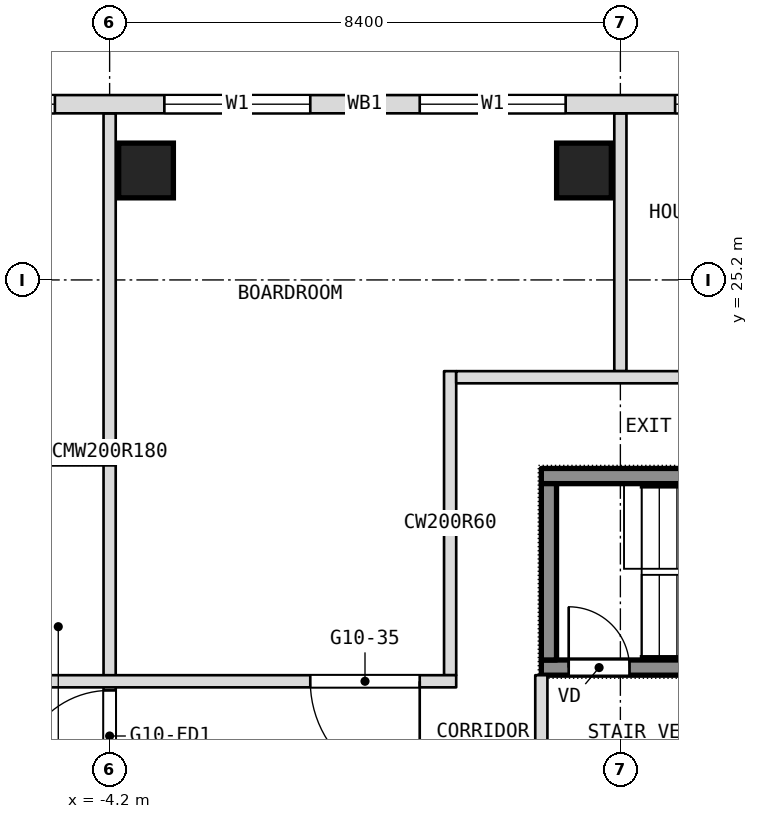
"""IFC4 building model, lengths in metres.
Left out: names, types, materials, properties, quantities, classifications, styles, units other than length and angle.
Written with IfcOpenShell. Run it as: python <this file> out.ifc"""

import sys

from ifc_helpers import new_model, si_unit, direction, frame, frame_2d, origin, origin_2d, place, context, subcontext, project, spatial, rectangle, extrude, element, fill, save


model = new_model("IFC4")
c1 = context("Model", 3, precision=1e-05, world=origin(), true_north=direction((0.0, 1.0)))
c2 = subcontext(c1, "Body", "Model", "MODEL_VIEW")
j1 = project(units=[si_unit("LENGTHUNIT", "METRE"), si_unit("PLANEANGLEUNIT", "RADIAN")], contexts=[c1])
p1 = place(None, origin())
s1 = spatial("IfcSite", under=j1, at=p1, CompositionType="ELEMENT")
p2 = place(p1, origin())
s2 = spatial("IfcBuilding", under=s1, at=p2, CompositionType="ELEMENT")
p3 = place(p2, frame((0.0, 0.0, 130.1)))
s3 = spatial("IfcBuildingStorey", under=s2, at=p3, CompositionType="ELEMENT", Elevation=130.1)
for number, where, z_axis, x_axis in (
    (1, (-3.601, 27.0, 0.0), (0.0, 0.0, 1.0), (1.0, 0.0, 0.0)),
    (2, (3.601, 27.0, 0.0), (0.0, 0.0, 1.0), (1.0, 0.0, 0.0)),
):
    element("IfcColumn", number, at=place(p3, frame(where, z_axis=z_axis, x_axis=x_axis)), inside=s3, PredefinedType="COLUMN", context=c2, shape_type="SweptSolid", body=[
        extrude(rectangle(XDim=0.9, YDim=0.9, at=origin_2d()), origin(), (0.0, 0.0, 1.0), 3.6),
    ])
p4 = place(p3, frame((4.2, 23.7, 0.0), z_axis=(0.0, 0.0, 1.0), x_axis=(0.0, 1.0, 0.0)))
e3 = element("IfcWall", 3, at=p4, inside=s3, PredefinedType="PARTITIONING", context=c2, shape_type="SweptSolid", body=[
    extrude(rectangle(XDim=4.24, YDim=0.2, at=frame_2d((2.12, 0.0))), origin(), (0.0, 0.0, 1.0), 3.34),
])
p5 = place(p3, frame((2.9, 16.9, 0.0), z_axis=(0.0, 0.0, 1.0), x_axis=(0.0, 1.0, 0.0)))
e4 = element("IfcWall", 4, at=p5, inside=s3, PredefinedType="PARTITIONING", context=c2, shape_type="SweptSolid", body=[
    extrude(rectangle(XDim=1.8, YDim=0.2, at=frame_2d((0.9, 0.0))), origin(), (0.0, 0.0, 1.0), 3.34),
])
p6 = place(p3, frame((1.4, 18.7, 0.0), z_axis=(0.0, 0.0, 1.0), x_axis=(0.0, 1.0, 0.0)))
e5 = element("IfcWall", 5, at=p6, inside=s3, PredefinedType="PARTITIONING", context=c2, shape_type="SweptSolid", body=[
    extrude(rectangle(XDim=5.0, YDim=0.2, at=frame_2d((2.5, 0.0))), origin(), (0.0, 0.0, 1.0), 3.34),
])
p7 = place(p3, frame((-4.2, 16.8, 0.0), z_axis=(0.0, 0.0, 1.0), x_axis=(0.0, 1.0, 0.0)))
e6 = element("IfcWall", 6, at=p7, inside=s3, PredefinedType="PARTITIONING", context=c2, shape_type="SweptSolid", body=[
    extrude(rectangle(XDim=11.14, YDim=0.2, at=frame_2d((5.57, 0.0))), origin(), (0.0, 0.0, 1.0), 3.34),
])
p8 = place(p7, frame((0.15, 0.0, 0.0)))
e7 = element("IfcOpeningElement", 7, at=p8, cuts=e6, PredefinedType="OPENING", context=c2, shape_type="SweptSolid", body=[
    extrude(rectangle(XDim=1.5, YDim=2.1, at=frame_2d((0.75, 1.05))), frame((0.0, 0.1, 0.0), z_axis=(0.0, -1.0, 0.0), x_axis=(1.0, 0.0, 0.0)), (0.0, 0.0, 1.0), 0.2),
])
p9 = place(p3, frame((-16.9, 18.6, 0.0), z_axis=(0.0, 0.0, 1.0), x_axis=(1.0, 0.0, 0.0)))
e8 = element("IfcWall", 8, at=p9, inside=s3, PredefinedType="PARTITIONING", context=c2, shape_type="SweptSolid", body=[
    extrude(rectangle(XDim=18.4, YDim=0.2, at=frame_2d((9.2, 0.0))), origin(), (0.0, 0.0, 1.0), 3.34),
])
p10 = place(p9, frame((0.5, 0.0, 0.0)))
e9 = element("IfcOpeningElement", 9, at=p10, cuts=e8, PredefinedType="OPENING", context=c2, shape_type="SweptSolid", body=[
    extrude(rectangle(XDim=1.0, YDim=2.1, at=frame_2d((0.5, 1.05))), frame((0.0, 0.1, 0.0), z_axis=(0.0, -1.0, 0.0), x_axis=(1.0, 0.0, 0.0)), (0.0, 0.0, 1.0), 0.2),
])
p11 = place(p9, frame((8.0, 0.0, 0.0)))
e10 = element("IfcOpeningElement", 10, at=p11, cuts=e8, PredefinedType="OPENING", context=c2, shape_type="SweptSolid", body=[
    extrude(rectangle(XDim=1.1, YDim=2.1, at=frame_2d((0.55, 1.05))), frame((0.0, 0.1, 0.0), z_axis=(0.0, -1.0, 0.0), x_axis=(1.0, 0.0, 0.0)), (0.0, 0.0, 1.0), 0.2),
])
p12 = place(p9, frame((16.0, 0.0, 0.0)))
e11 = element("IfcOpeningElement", 11, at=p12, cuts=e8, PredefinedType="OPENING", context=c2, shape_type="SweptSolid", body=[
    extrude(rectangle(XDim=1.8, YDim=2.1, at=frame_2d((0.9, 1.05))), frame((0.0, 0.1, 0.0), z_axis=(0.0, -1.0, 0.0), x_axis=(1.0, 0.0, 0.0)), (0.0, 0.0, 1.0), 0.2),
])
p13 = place(p3, frame((-6.65, 22.2, 0.0), z_axis=(0.0, 0.0, 1.0), x_axis=(1.0, 0.0, 0.0)))
e12 = element("IfcWall", 12, at=p13, inside=s3, PredefinedType="PARTITIONING", context=c2, shape_type="SweptSolid", body=[
    extrude(rectangle(XDim=2.55, YDim=0.1, at=frame_2d((1.275, 0.0))), origin(), (0.0, 0.0, 1.0), 3.34),
])
p14 = place(p3, frame((1.5, 23.6, 0.0), z_axis=(0.0, 0.0, 1.0), x_axis=(1.0, 0.0, 0.0)))
e13 = element("IfcWall", 13, at=p14, inside=s3, PredefinedType="PARTITIONING", context=c2, shape_type="SweptSolid", body=[
    extrude(rectangle(XDim=9.2, YDim=0.2, at=frame_2d((4.6, 0.0))), origin(), (0.0, 0.0, 1.0), 3.34),
])
p15 = place(p14, frame((4.3, 0.0, 0.0)))
e14 = element("IfcOpeningElement", 14, at=p15, cuts=e13, PredefinedType="OPENING", context=c2, shape_type="SweptSolid", body=[
    extrude(rectangle(XDim=1.0, YDim=2.1, at=frame_2d((0.5, 1.05))), frame((0.0, 0.1, 0.0), z_axis=(0.0, -1.0, 0.0), x_axis=(1.0, 0.0, 0.0)), (0.0, 0.0, 1.0), 0.2),
])
p16 = place(p3, frame((21.306, 28.09, 0.0), z_axis=(0.0, 0.0, 1.0), x_axis=(-1.0, 0.0, 0.0)))
e15 = element("IfcWall", 15, at=p16, inside=s3, PredefinedType="NOTDEFINED", context=c2, shape_type="SweptSolid", body=[
    extrude(rectangle(XDim=42.612, YDim=0.3, at=frame_2d((21.306, 0.0))), origin(), (0.0, 0.0, 1.0), 3.6),
])
p17 = place(p16, frame((5.406, 0.0, 0.9)))
e16 = element("IfcOpeningElement", 16, at=p17, cuts=e15, PredefinedType="OPENING", context=c2, shape_type="SweptSolid", body=[
    extrude(rectangle(XDim=2.4, YDim=2.1, at=frame_2d((1.2, 1.05))), frame((0.0, 0.15, 0.0), z_axis=(0.0, -1.0, 0.0), x_axis=(1.0, 0.0, 0.0)), (0.0, 0.0, 1.0), 0.3),
])
p18 = place(p16, frame((9.606, 0.0, 0.9)))
e17 = element("IfcOpeningElement", 17, at=p18, cuts=e15, PredefinedType="OPENING", context=c2, shape_type="SweptSolid", body=[
    extrude(rectangle(XDim=2.4, YDim=2.1, at=frame_2d((1.2, 1.05))), frame((0.0, 0.15, 0.0), z_axis=(0.0, -1.0, 0.0), x_axis=(1.0, 0.0, 0.0)), (0.0, 0.0, 1.0), 0.3),
])
p19 = place(p16, frame((13.806, 0.0, 0.9)))
e18 = element("IfcOpeningElement", 18, at=p19, cuts=e15, PredefinedType="OPENING", context=c2, shape_type="SweptSolid", body=[
    extrude(rectangle(XDim=2.4, YDim=2.1, at=frame_2d((1.2, 1.05))), frame((0.0, 0.15, 0.0), z_axis=(0.0, -1.0, 0.0), x_axis=(1.0, 0.0, 0.0)), (0.0, 0.0, 1.0), 0.3),
])
p20 = place(p16, frame((18.006, 0.0, 0.9)))
e19 = element("IfcOpeningElement", 19, at=p20, cuts=e15, PredefinedType="OPENING", context=c2, shape_type="SweptSolid", body=[
    extrude(rectangle(XDim=2.4, YDim=2.1, at=frame_2d((1.2, 1.05))), frame((0.0, 0.15, 0.0), z_axis=(0.0, -1.0, 0.0), x_axis=(1.0, 0.0, 0.0)), (0.0, 0.0, 1.0), 0.3),
])
p21 = place(p16, frame((22.206, 0.0, 0.9)))
e20 = element("IfcOpeningElement", 20, at=p21, cuts=e15, PredefinedType="OPENING", context=c2, shape_type="SweptSolid", body=[
    extrude(rectangle(XDim=2.4, YDim=2.1, at=frame_2d((1.2, 1.05))), frame((0.0, 0.15, 0.0), z_axis=(0.0, -1.0, 0.0), x_axis=(1.0, 0.0, 0.0)), (0.0, 0.0, 1.0), 0.3),
])
p22 = place(p16, frame((26.406, 0.0, 0.9)))
e21 = element("IfcOpeningElement", 21, at=p22, cuts=e15, PredefinedType="OPENING", context=c2, shape_type="SweptSolid", body=[
    extrude(rectangle(XDim=2.4, YDim=2.1, at=frame_2d((1.2, 1.05))), frame((0.0, 0.15, 0.0), z_axis=(0.0, -1.0, 0.0), x_axis=(1.0, 0.0, 0.0)), (0.0, 0.0, 1.0), 0.3),
])
p23 = place(p16, frame((30.606, 0.0, 0.9)))
e22 = element("IfcOpeningElement", 22, at=p23, cuts=e15, PredefinedType="OPENING", context=c2, shape_type="SweptSolid", body=[
    extrude(rectangle(XDim=2.4, YDim=2.1, at=frame_2d((1.2, 1.05))), frame((0.0, 0.15, 0.0), z_axis=(0.0, -1.0, 0.0), x_axis=(1.0, 0.0, 0.0)), (0.0, 0.0, 1.0), 0.3),
])
p24 = place(p16, frame((34.806, 0.0, 0.9)))
e23 = element("IfcOpeningElement", 23, at=p24, cuts=e15, PredefinedType="OPENING", context=c2, shape_type="SweptSolid", body=[
    extrude(rectangle(XDim=2.4, YDim=2.1, at=frame_2d((1.2, 1.05))), frame((0.0, 0.15, 0.0), z_axis=(0.0, -1.0, 0.0), x_axis=(1.0, 0.0, 0.0)), (0.0, 0.0, 1.0), 0.3),
])
p25 = place(p3, frame((2.9, 18.825, 0.1), z_axis=(0.0, 0.0, 1.0), x_axis=(1.0, 0.0, 0.0)))
e24 = element("IfcWall", 24, at=p25, inside=s3, PredefinedType="SHEAR", context=c2, shape_type="SweptSolid", body=[
    extrude(rectangle(XDim=6.2, YDim=0.25, at=frame_2d((3.1, 0.0))), origin(), (0.0, 0.0, 1.0), 3.6),
])
p26 = place(p25, frame((0.45, 0.0, 0.0)))
e25 = element("IfcOpeningElement", 25, at=p26, cuts=e24, PredefinedType="OPENING", context=c2, shape_type="SweptSolid", body=[
    extrude(rectangle(XDim=1.0, YDim=2.1, at=frame_2d((0.5, 1.05))), frame((0.0, 0.125, 0.0), z_axis=(0.0, -1.0, 0.0), x_axis=(1.0, 0.0, 0.0)), (0.0, 0.0, 1.0), 0.25),
])
p27 = place(p3, frame((2.9, 21.975, 0.1), z_axis=(0.0, 0.0, 1.0), x_axis=(1.0, 0.0, 0.0)))
e26 = element("IfcWall", 26, at=p27, inside=s3, PredefinedType="SHEAR", context=c2, shape_type="SweptSolid", body=[
    extrude(rectangle(XDim=6.2, YDim=0.25, at=frame_2d((3.1, 0.0))), origin(), (0.0, 0.0, 1.0), 3.6),
])
p28 = place(p3, frame((3.025, 18.95, 0.1), z_axis=(0.0, 0.0, 1.0), x_axis=(0.0, 1.0, 0.0)))
e27 = element("IfcWall", 27, at=p28, inside=s3, PredefinedType="SHEAR", context=c2, shape_type="SweptSolid", body=[
    extrude(rectangle(XDim=2.9, YDim=0.25, at=frame_2d((1.45, 0.0))), origin(), (0.0, 0.0, 1.0), 3.6),
])
p29 = place(p12, origin())
e28 = element("IfcDoor", 28, at=p29, inside=s3, OperationType="DOUBLE_DOOR_SINGLE_SWING", PredefinedType="DOOR", context=c2, shape_type="SweptSolid", body=[
    extrude(rectangle(XDim=1.8, YDim=2.1, at=frame_2d((0.9, 1.05))), frame((0.0, 0.025, 0.0), z_axis=(0.0, -1.0, 0.0), x_axis=(1.0, 0.0, 0.0)), (0.0, 0.0, 1.0), 0.05),
])
fill(e11, e28)
p30 = place(p19, origin())
e29 = element("IfcWindow", 29, at=p30, inside=s3, PartitioningType="SINGLE_PANEL", PredefinedType="WINDOW", context=c2, shape_type="SweptSolid", body=[
    extrude(rectangle(XDim=2.4, YDim=2.1, at=frame_2d((1.2, 1.05))), frame((0.0, 0.03, 0.0), z_axis=(0.0, -1.0, 0.0), x_axis=(1.0, 0.0, 0.0)), (0.0, 0.0, 1.0), 0.06),
])
fill(e18, e29)
p31 = place(p20, origin())
e30 = element("IfcWindow", 30, at=p31, inside=s3, PartitioningType="SINGLE_PANEL", PredefinedType="WINDOW", context=c2, shape_type="SweptSolid", body=[
    extrude(rectangle(XDim=2.4, YDim=2.1, at=frame_2d((1.2, 1.05))), frame((0.0, 0.03, 0.0), z_axis=(0.0, -1.0, 0.0), x_axis=(1.0, 0.0, 0.0)), (0.0, 0.0, 1.0), 0.06),
])
fill(e19, e30)
p32 = place(p21, origin())
e31 = element("IfcWindow", 31, at=p32, inside=s3, PartitioningType="SINGLE_PANEL", PredefinedType="WINDOW", context=c2, shape_type="SweptSolid", body=[
    extrude(rectangle(XDim=2.4, YDim=2.1, at=frame_2d((1.2, 1.05))), frame((0.0, 0.03, 0.0), z_axis=(0.0, -1.0, 0.0), x_axis=(1.0, 0.0, 0.0)), (0.0, 0.0, 1.0), 0.06),
])
fill(e20, e31)
p33 = place(p22, origin())
e32 = element("IfcWindow", 32, at=p33, inside=s3, PartitioningType="SINGLE_PANEL", PredefinedType="WINDOW", context=c2, shape_type="SweptSolid", body=[
    extrude(rectangle(XDim=2.4, YDim=2.1, at=frame_2d((1.2, 1.05))), frame((0.0, 0.03, 0.0), z_axis=(0.0, -1.0, 0.0), x_axis=(1.0, 0.0, 0.0)), (0.0, 0.0, 1.0), 0.06),
])
fill(e21, e32)
p34 = place(p26, origin())
e33 = element("IfcDoor", 33, at=p34, inside=s3, OperationType="SINGLE_SWING_LEFT", PredefinedType="DOOR", context=c2, shape_type="SweptSolid", body=[
    extrude(rectangle(XDim=1.0, YDim=2.1, at=frame_2d((0.5, 1.05))), frame((0.0, 0.025, 0.0), z_axis=(0.0, -1.0, 0.0), x_axis=(1.0, 0.0, 0.0)), (0.0, 0.0, 1.0), 0.05),
])
fill(e25, e33)
p35 = place(p8, origin())
e34 = element("IfcDoor", 34, at=p35, inside=s3, OperationType="DOUBLE_DOOR_DOUBLE_SWING", PredefinedType="DOOR", context=c2, shape_type="SweptSolid", body=[
    extrude(rectangle(XDim=1.5, YDim=2.1, at=frame_2d((0.75, 1.05))), frame((0.0, 0.025, 0.0), z_axis=(0.0, -1.0, 0.0), x_axis=(1.0, 0.0, 0.0)), (0.0, 0.0, 1.0), 0.05),
])
fill(e7, e34)
save(model, sys.argv[1])
